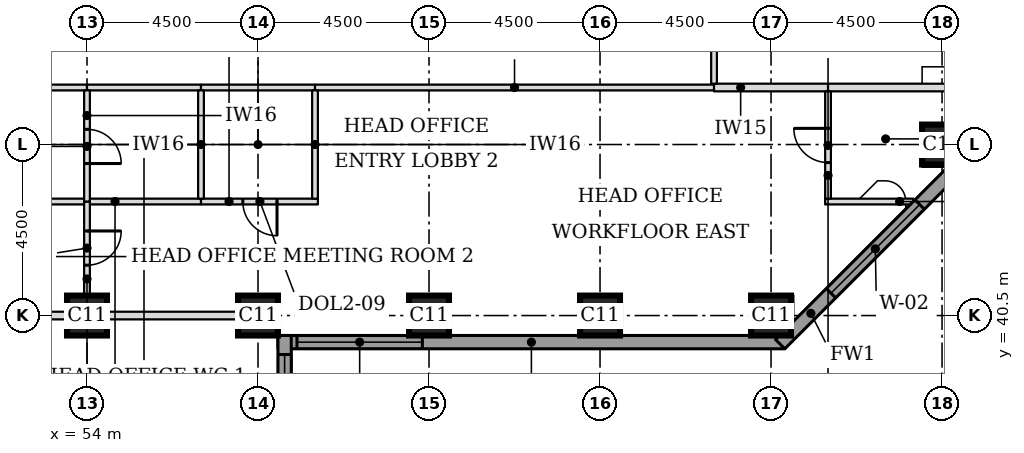
"""IFC4 building model, lengths in metres.
Left out: names, types, materials, properties, quantities, classifications, styles, units other than length and angle.
Written with IfcOpenShell. Run it as: python <this file> out.ifc"""

import sys

from ifc_helpers import new_model, si_unit, direction, frame, frame_2d, origin, origin_2d, place, context, subcontext, project, spatial, rectangle, extrude, element, fill, save


model = new_model("IFC4")
c1 = context("Model", 3, precision=1e-05, world=origin(), true_north=direction((0.0, 1.0)))
c2 = subcontext(c1, "Body", "Model", "MODEL_VIEW")
j1 = project(units=[si_unit("LENGTHUNIT", "METRE"), si_unit("PLANEANGLEUNIT", "RADIAN")], contexts=[c1])
p1 = place(None, origin())
s1 = spatial("IfcSite", under=j1, at=p1, CompositionType="ELEMENT")
p2 = place(p1, origin())
s2 = spatial("IfcBuilding", under=s1, at=p2, CompositionType="ELEMENT")
p3 = place(p2, frame((0.0, 0.0, 86.3)))
s3 = spatial("IfcBuildingStorey", under=s2, at=p3, CompositionType="ELEMENT", Elevation=86.3)
for number, where, z_axis, x_axis in (
    (1, (54.0, 40.5, 0.0), (0.0, 0.0, 1.0), (1.0, 0.0, 0.0)),
    (2, (58.5, 40.5, 0.0), (0.0, 0.0, 1.0), (1.0, 0.0, 0.0)),
    (3, (63.0, 40.5, 0.0), (0.0, 0.0, 1.0), (1.0, 0.0, 0.0)),
    (4, (67.5, 40.5, 0.0), (0.0, 0.0, 1.0), (1.0, 0.0, 0.0)),
    (5, (72.0, 40.5, 0.0), (0.0, 0.0, 1.0), (1.0, 0.0, 0.0)),
    (6, (76.5, 45.0, 0.0), (0.0, 0.0, 1.0), (1.0, 0.0, 0.0)),
):
    element("IfcColumn", number, at=place(p3, frame(where, z_axis=z_axis, x_axis=x_axis)), inside=s3, PredefinedType="COLUMN", context=c2, shape_type="SweptSolid", body=[
        extrude(rectangle(XDim=1.05, YDim=1.05, at=origin_2d()), origin(), (0.0, 0.0, 1.0), 3.7),
    ])
p4 = place(p3, frame((59.025, 39.8, 0.0), z_axis=(0.0, 0.0, 1.0), x_axis=(1.0, 0.0, 0.0)))
e7 = element("IfcWall", 7, at=p4, inside=s3, PredefinedType="STANDARD", context=c2, shape_type="SweptSolid", body=[
    extrude(rectangle(XDim=13.337, YDim=0.35, at=frame_2d((6.669, 0.0))), origin(), (0.0, 0.0, 1.0), 3.525),
])
p5 = place(p4, frame((0.5, 0.0, 0.9)))
e8 = element("IfcOpeningElement", 8, at=p5, cuts=e7, PredefinedType="OPENING", context=c2, shape_type="SweptSolid", body=[
    extrude(rectangle(XDim=3.3, YDim=1.9, at=frame_2d((1.65, 0.95))), frame((0.0, 0.185, 0.0), z_axis=(0.0, -1.0, 0.0), x_axis=(1.0, 0.0, 0.0)), (0.0, 0.0, 1.0), 0.37),
])
p6 = place(p3, frame((72.239, 39.749, 0.0), z_axis=(0.0, 0.0, 1.0), x_axis=(0.707106781187, 0.707106781187, 0.0)))
e9 = element("IfcWall", 9, at=p6, inside=s3, PredefinedType="STANDARD", context=c2, shape_type="SweptSolid", body=[
    extrude(rectangle(XDim=7.089, YDim=0.35, at=frame_2d((3.544, 0.0))), origin(), (0.0, 0.0, 1.0), 3.525),
])
p7 = place(p6, frame((1.894, 0.0, 0.9)))
e10 = element("IfcOpeningElement", 10, at=p7, cuts=e9, PredefinedType="OPENING", context=c2, shape_type="SweptSolid", body=[
    extrude(rectangle(XDim=3.3, YDim=1.9, at=frame_2d((1.65, 0.95))), frame((0.0, 0.185, 0.0), z_axis=(0.0, -1.0, 0.0), x_axis=(1.0, 0.0, 0.0)), (0.0, 0.0, 1.0), 0.37),
])
p8 = place(p3, frame((59.2, 22.138, 0.0), z_axis=(0.0, 0.0, 1.0), x_axis=(0.0, 1.0, 0.0)))
e11 = element("IfcWall", 11, at=p8, inside=s3, PredefinedType="STANDARD", context=c2, shape_type="SweptSolid", body=[
    extrude(rectangle(XDim=17.837, YDim=0.35, at=frame_2d((8.919, 0.0))), origin(), (0.0, 0.0, 1.0), 3.525),
])
p9 = place(p8, frame((5.462, 0.0, 0.9)))
e12 = element("IfcOpeningElement", 12, at=p9, cuts=e11, PredefinedType="OPENING", context=c2, shape_type="SweptSolid", body=[
    extrude(rectangle(XDim=3.3, YDim=1.9, at=frame_2d((1.65, 0.95))), frame((0.0, 0.185, 0.0), z_axis=(0.0, -1.0, 0.0), x_axis=(1.0, 0.0, 0.0)), (0.0, 0.0, 1.0), 0.37),
])
p10 = place(p8, frame((14.037, 0.0, 0.9)))
e13 = element("IfcOpeningElement", 13, at=p10, cuts=e11, PredefinedType="OPENING", context=c2, shape_type="SweptSolid", body=[
    extrude(rectangle(XDim=3.3, YDim=1.9, at=frame_2d((1.65, 0.95))), frame((0.0, 0.185, 0.0), z_axis=(0.0, -1.0, 0.0), x_axis=(1.0, 0.0, 0.0)), (0.0, 0.0, 1.0), 0.37),
])
p11 = place(p3, frame((50.015, 40.5, 0.0), z_axis=(0.0, 0.0, 1.0), x_axis=(1.0, 0.0, 0.0)))
e14 = element("IfcWall", 14, at=p11, inside=s3, PredefinedType="PARTITIONING", context=c2, shape_type="SweptSolid", body=[
    extrude(rectangle(XDim=3.46, YDim=0.2, at=frame_2d((1.73, 0.0))), origin(), (0.0, 0.0, 1.0), 2.8),
])
p12 = place(p3, frame((54.495, 40.5, 0.0), z_axis=(0.0, 0.0, 1.0), x_axis=(1.0, 0.0, 0.0)))
e15 = element("IfcWall", 15, at=p12, inside=s3, PredefinedType="PARTITIONING", context=c2, shape_type="SweptSolid", body=[
    extrude(rectangle(XDim=3.48, YDim=0.2, at=frame_2d((1.74, 0.0))), origin(), (0.0, 0.0, 1.0), 2.8),
])
p13 = place(p3, frame((49.575, 43.5, 0.0), z_axis=(0.0, 0.0, 1.0), x_axis=(1.0, 0.0, 0.0)))
e16 = element("IfcWall", 16, at=p13, inside=s3, PredefinedType="PARTITIONING", context=c2, shape_type="SweptSolid", body=[
    extrude(rectangle(XDim=4.35, YDim=0.15, at=frame_2d((2.175, 0.0))), origin(), (0.0, 0.0, 1.0), 3.55),
])
p14 = place(p13, frame((1.7, 0.0, 0.0)))
e17 = element("IfcOpeningElement", 17, at=p14, cuts=e16, PredefinedType="OPENING", context=c2, shape_type="SweptSolid", body=[
    extrude(rectangle(XDim=0.9, YDim=2.1, at=frame_2d((0.45, 1.05))), frame((0.0, 0.085, 0.0), z_axis=(0.0, -1.0, 0.0), x_axis=(1.0, 0.0, 0.0)), (0.0, 0.0, 1.0), 0.17),
])
p15 = place(p3, frame((54.075, 43.5, 0.0), z_axis=(0.0, 0.0, 1.0), x_axis=(1.0, 0.0, 0.0)))
e18 = element("IfcWall", 18, at=p15, inside=s3, PredefinedType="PARTITIONING", context=c2, shape_type="SweptSolid", body=[
    extrude(rectangle(XDim=2.925, YDim=0.15, at=frame_2d((1.462, 0.0))), origin(), (0.0, 0.0, 1.0), 3.55),
])
p16 = place(p3, frame((57.0, 43.5, 0.0), z_axis=(0.0, 0.0, 1.0), x_axis=(1.0, 0.0, 0.0)))
e19 = element("IfcWall", 19, at=p16, inside=s3, PredefinedType="PARTITIONING", context=c2, shape_type="SweptSolid", body=[
    extrude(rectangle(XDim=3.075, YDim=0.15, at=frame_2d((1.538, 0.0))), origin(), (0.0, 0.0, 1.0), 3.55),
])
p17 = place(p16, frame((1.1, 0.0, 0.0)))
e20 = element("IfcOpeningElement", 20, at=p17, cuts=e19, PredefinedType="OPENING", context=c2, shape_type="SweptSolid", body=[
    extrude(rectangle(XDim=0.9, YDim=2.1, at=frame_2d((0.45, 1.05))), frame((0.0, 0.085, 0.0), z_axis=(0.0, -1.0, 0.0), x_axis=(1.0, 0.0, 0.0)), (0.0, 0.0, 1.0), 0.17),
])
p18 = place(p3, frame((73.425, 43.5, 0.0), z_axis=(0.0, 0.0, 1.0), x_axis=(1.0, 0.0, 0.0)))
e21 = element("IfcWall", 21, at=p18, inside=s3, PredefinedType="PARTITIONING", context=c2, shape_type="SweptSolid", body=[
    extrude(rectangle(XDim=2.317, YDim=0.15, at=frame_2d((1.159, 0.0))), origin(), (0.0, 0.0, 1.0), 3.55),
])
p19 = place(p3, frame((49.425, 46.5, 0.0), z_axis=(0.0, 0.0, 1.0), x_axis=(1.0, 0.0, 0.0)))
e22 = element("IfcWall", 22, at=p19, inside=s3, PredefinedType="PARTITIONING", context=c2, shape_type="SweptSolid", body=[
    extrude(rectangle(XDim=4.575, YDim=0.15, at=frame_2d((2.288, 0.0))), origin(), (0.0, 0.0, 1.0), 3.55),
])
p20 = place(p19, frame((1.8, 0.0, 0.0)))
e23 = element("IfcOpeningElement", 23, at=p20, cuts=e22, PredefinedType="OPENING", context=c2, shape_type="SweptSolid", body=[
    extrude(rectangle(XDim=1.0, YDim=2.1, at=frame_2d((0.5, 1.05))), frame((0.0, 0.085, 0.0), z_axis=(0.0, -1.0, 0.0), x_axis=(1.0, 0.0, 0.0)), (0.0, 0.0, 1.0), 0.17),
])
for number, where, z_axis, x_axis in (
    (24, (54.0, 46.5, 0.0), (0.0, 0.0, 1.0), (1.0, 0.0, 0.0)),
    (25, (57.0, 46.5, 0.0), (0.0, 0.0, 1.0), (1.0, 0.0, 0.0)),
):
    element("IfcWall", number, at=place(p3, frame(where, z_axis=z_axis, x_axis=x_axis)), inside=s3, PredefinedType="PARTITIONING", context=c2, shape_type="SweptSolid", body=[
        extrude(rectangle(XDim=3.0, YDim=0.15, at=frame_2d((1.5, 0.0))), origin(), (0.0, 0.0, 1.0), 3.55),
    ])
p21 = place(p3, frame((60.0, 46.5, 0.0), z_axis=(0.0, 0.0, 1.0), x_axis=(1.0, 0.0, 0.0)))
e26 = element("IfcWall", 26, at=p21, inside=s3, PredefinedType="PARTITIONING", context=c2, shape_type="SweptSolid", body=[
    extrude(rectangle(XDim=10.5, YDim=0.15, at=frame_2d((5.25, 0.0))), origin(), (0.0, 0.0, 1.0), 3.55),
])
p22 = place(p3, frame((70.5, 46.5, 0.0), z_axis=(0.0, 0.0, 1.0), x_axis=(1.0, 0.0, 0.0)))
e27 = element("IfcWall", 27, at=p22, inside=s3, PredefinedType="PARTITIONING", context=c2, shape_type="SweptSolid", body=[
    extrude(rectangle(XDim=3.0, YDim=0.2, at=frame_2d((1.5, 0.0))), origin(), (0.0, 0.0, 1.0), 3.55),
])
p23 = place(p3, frame((73.5, 46.5, 0.0), z_axis=(0.0, 0.0, 1.0), x_axis=(1.0, 0.0, 0.0)))
e28 = element("IfcWall", 28, at=p23, inside=s3, PredefinedType="PARTITIONING", context=c2, shape_type="SweptSolid", body=[
    extrude(rectangle(XDim=3.525, YDim=0.2, at=frame_2d((1.762, 0.0))), origin(), (0.0, 0.0, 1.0), 3.55),
])
p24 = place(p3, frame((54.0, 41.025, 0.0), z_axis=(0.0, 0.0, 1.0), x_axis=(0.0, 1.0, 0.0)))
e29 = element("IfcWall", 29, at=p24, inside=s3, PredefinedType="PARTITIONING", context=c2, shape_type="SweptSolid", body=[
    extrude(rectangle(XDim=2.475, YDim=0.15, at=frame_2d((1.238, 0.0))), origin(), (0.0, 0.0, 1.0), 3.55),
])
p25 = place(p24, frame((0.8, 0.0, 0.0)))
e30 = element("IfcOpeningElement", 30, at=p25, cuts=e29, PredefinedType="OPENING", context=c2, shape_type="SweptSolid", body=[
    extrude(rectangle(XDim=0.9, YDim=2.1, at=frame_2d((0.45, 1.05))), frame((0.0, 0.085, 0.0), z_axis=(0.0, -1.0, 0.0), x_axis=(1.0, 0.0, 0.0)), (0.0, 0.0, 1.0), 0.17),
])
p26 = place(p3, frame((54.0, 43.5, 0.0), z_axis=(0.0, 0.0, 1.0), x_axis=(0.0, 1.0, 0.0)))
e31 = element("IfcWall", 31, at=p26, inside=s3, PredefinedType="PARTITIONING", context=c2, shape_type="SweptSolid", body=[
    extrude(rectangle(XDim=2.925, YDim=0.15, at=frame_2d((1.462, 0.0))), origin(), (0.0, 0.0, 1.0), 3.55),
])
p27 = place(p26, frame((1.0, 0.0, 0.0)))
e32 = element("IfcOpeningElement", 32, at=p27, cuts=e31, PredefinedType="OPENING", context=c2, shape_type="SweptSolid", body=[
    extrude(rectangle(XDim=0.9, YDim=2.1, at=frame_2d((0.45, 1.05))), frame((0.0, 0.085, 0.0), z_axis=(0.0, -1.0, 0.0), x_axis=(1.0, 0.0, 0.0)), (0.0, 0.0, 1.0), 0.17),
])
for number, where, z_axis, x_axis in (
    (33, (57.0, 43.575, 0.0), (0.0, 0.0, 1.0), (0.0, 1.0, 0.0)),
    (34, (60.0, 43.575, 0.0), (0.0, 0.0, 1.0), (0.0, 1.0, 0.0)),
):
    element("IfcWall", number, at=place(p3, frame(where, z_axis=z_axis, x_axis=x_axis)), inside=s3, PredefinedType="PARTITIONING", context=c2, shape_type="SweptSolid", body=[
        extrude(rectangle(XDim=2.85, YDim=0.15, at=frame_2d((1.425, 0.0))), origin(), (0.0, 0.0, 1.0), 3.55),
    ])
p28 = place(p3, frame((73.5, 43.575, 0.0), z_axis=(0.0, 0.0, 1.0), x_axis=(0.0, 1.0, 0.0)))
e35 = element("IfcWall", 35, at=p28, inside=s3, PredefinedType="PARTITIONING", context=c2, shape_type="SweptSolid", body=[
    extrude(rectangle(XDim=2.825, YDim=0.15, at=frame_2d((1.413, 0.0))), origin(), (0.0, 0.0, 1.0), 3.55),
])
p29 = place(p28, frame((0.95, 0.0, 0.0)))
e36 = element("IfcOpeningElement", 36, at=p29, cuts=e35, PredefinedType="OPENING", context=c2, shape_type="SweptSolid", body=[
    extrude(rectangle(XDim=0.9, YDim=2.1, at=frame_2d((0.45, 1.05))), frame((0.0, 0.085, 0.0), z_axis=(0.0, -1.0, 0.0), x_axis=(1.0, 0.0, 0.0)), (0.0, 0.0, 1.0), 0.17),
])
p30 = place(p3, frame((70.5, 46.6, 0.0), z_axis=(0.0, 0.0, 1.0), x_axis=(0.0, 1.0, 0.0)))
e37 = element("IfcWall", 37, at=p30, inside=s3, PredefinedType="PARTITIONING", context=c2, shape_type="SweptSolid", body=[
    extrude(rectangle(XDim=28.3, YDim=0.15, at=frame_2d((14.15, 0.0))), origin(), (0.0, 0.0, 1.0), 3.55),
])
p31 = place(p30, frame((13.65, 0.0, 0.0)))
e38 = element("IfcOpeningElement", 38, at=p31, cuts=e37, PredefinedType="OPENING", context=c2, shape_type="SweptSolid", body=[
    extrude(rectangle(XDim=1.0, YDim=2.1, at=frame_2d((0.5, 1.05))), frame((0.0, 0.085, 0.0), z_axis=(0.0, -1.0, 0.0), x_axis=(1.0, 0.0, 0.0)), (0.0, 0.0, 1.0), 0.17),
])
p32 = place(p5, origin())
e39 = element("IfcWindow", 39, at=p32, inside=s3, PartitioningType="SINGLE_PANEL", PredefinedType="WINDOW", context=c2, shape_type="SweptSolid", body=[
    extrude(rectangle(XDim=3.3, YDim=1.9, at=frame_2d((1.65, 0.95))), frame((0.0, 0.085, 0.0), z_axis=(0.0, -1.0, 0.0), x_axis=(1.0, 0.0, 0.0)), (0.0, 0.0, 1.0), 0.06),
])
fill(e8, e39)
p33 = place(p7, origin())
e40 = element("IfcWindow", 40, at=p33, inside=s3, PartitioningType="SINGLE_PANEL", PredefinedType="WINDOW", context=c2, shape_type="SweptSolid", body=[
    extrude(rectangle(XDim=3.3, YDim=1.9, at=frame_2d((1.65, 0.95))), frame((0.0, 0.085, 0.0), z_axis=(0.0, -1.0, 0.0), x_axis=(1.0, 0.0, 0.0)), (0.0, 0.0, 1.0), 0.06),
])
fill(e10, e40)
p34 = place(p10, origin())
e41 = element("IfcWindow", 41, at=p34, inside=s3, PartitioningType="SINGLE_PANEL", PredefinedType="WINDOW", context=c2, shape_type="SweptSolid", body=[
    extrude(rectangle(XDim=3.3, YDim=1.9, at=frame_2d((1.65, 0.95))), frame((0.0, 0.085, 0.0), z_axis=(0.0, -1.0, 0.0), x_axis=(1.0, 0.0, 0.0)), (0.0, 0.0, 1.0), 0.06),
])
fill(e13, e41)
p35 = place(p27, frame((0.9, 0.0, 0.0), z_axis=(0.0, 0.0, 1.0), x_axis=(-1.0, 0.0, 0.0)))
e42 = element("IfcDoor", 42, at=p35, inside=s3, OperationType="SINGLE_SWING_RIGHT", PredefinedType="DOOR", context=c2, shape_type="SweptSolid", body=[
    extrude(rectangle(XDim=0.9, YDim=2.1, at=frame_2d((0.45, 1.05))), frame((0.0, 0.025, 0.0), z_axis=(0.0, -1.0, 0.0), x_axis=(1.0, 0.0, 0.0)), (0.0, 0.0, 1.0), 0.05),
])
fill(e32, e42)
p36 = place(p25, frame((0.9, 0.0, 0.0), z_axis=(0.0, 0.0, 1.0), x_axis=(-1.0, 0.0, 0.0)))
e43 = element("IfcDoor", 43, at=p36, inside=s3, OperationType="SINGLE_SWING_LEFT", PredefinedType="DOOR", context=c2, shape_type="SweptSolid", body=[
    extrude(rectangle(XDim=0.9, YDim=2.1, at=frame_2d((0.45, 1.05))), frame((0.0, 0.025, 0.0), z_axis=(0.0, -1.0, 0.0), x_axis=(1.0, 0.0, 0.0)), (0.0, 0.0, 1.0), 0.05),
])
fill(e30, e43)
p37 = place(p17, frame((0.9, 0.0, 0.0), z_axis=(0.0, 0.0, 1.0), x_axis=(-1.0, 0.0, 0.0)))
e44 = element("IfcDoor", 44, at=p37, inside=s3, OperationType="SINGLE_SWING_LEFT", PredefinedType="DOOR", context=c2, shape_type="SweptSolid", body=[
    extrude(rectangle(XDim=0.9, YDim=2.1, at=frame_2d((0.45, 1.05))), frame((0.0, 0.025, 0.0), z_axis=(0.0, -1.0, 0.0), x_axis=(1.0, 0.0, 0.0)), (0.0, 0.0, 1.0), 0.05),
])
fill(e20, e44)
p38 = place(p29, origin())
e45 = element("IfcDoor", 45, at=p38, inside=s3, OperationType="SINGLE_SWING_RIGHT", PredefinedType="DOOR", context=c2, shape_type="SweptSolid", body=[
    extrude(rectangle(XDim=0.9, YDim=2.1, at=frame_2d((0.45, 1.05))), frame((0.0, 0.025, 0.0), z_axis=(0.0, -1.0, 0.0), x_axis=(1.0, 0.0, 0.0)), (0.0, 0.0, 1.0), 0.05),
])
fill(e36, e45)
save(model, sys.argv[1])
